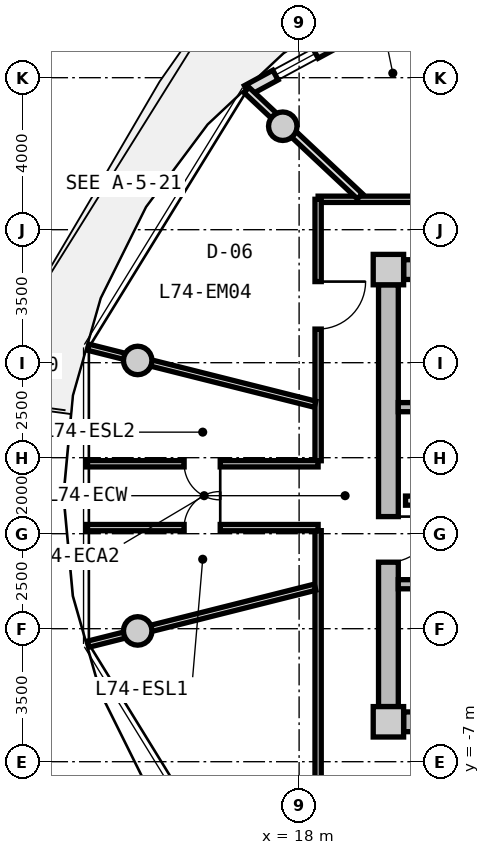
"""IFC4 building model, lengths in metres.
Left out: names, types, materials, properties, quantities, classifications, styles, units other than length and angle.
Written with IfcOpenShell. Run it as: python <this file> out.ifc"""

import sys

from ifc_helpers import new_model, si_unit, direction, frame, frame_2d, origin, origin_2d, place, context, subcontext, project, spatial, rectangle, circle, extrude, source, transform, mapped, element, fill, save


model = new_model("IFC4")
c1 = context("Model", 3, precision=1e-05, world=origin(), true_north=direction((0.0, 1.0)))
c2 = subcontext(c1, "Body", "Model", "MODEL_VIEW")
j1 = project(units=[si_unit("LENGTHUNIT", "METRE"), si_unit("PLANEANGLEUNIT", "RADIAN")], contexts=[c1])
p1 = place(None, origin())
s1 = spatial("IfcSite", under=j1, at=p1, CompositionType="ELEMENT")
p2 = place(p1, origin())
s2 = spatial("IfcBuilding", under=s1, at=p2, CompositionType="ELEMENT")
p3 = place(p2, frame((0.0, 0.0, 238.3)))
s3 = spatial("IfcBuildingStorey", under=s2, at=p3, CompositionType="ELEMENT", Elevation=238.3)
m1 = source(origin(), c2, "Body", "SweptSolid", [
    extrude(rectangle(XDim=0.8, YDim=0.8, at=origin_2d()), origin(), (0.0, 0.0, 1.0), 3.05),
])
for number, where, z_axis, x_axis in (
    (1, (20.35, -5.95, 0.0), (0.0, 0.0, 1.0), (1.0, 0.0, 0.0)),
    (2, (20.35, 5.95, 0.0), (0.0, 0.0, 1.0), (1.0, 0.0, 0.0)),
):
    element("IfcColumn", number, at=place(p3, frame(where, z_axis=z_axis, x_axis=x_axis)), inside=s3, PredefinedType="COLUMN", context=c2, shape_type="MappedRepresentation", body=[
        mapped(m1, transform((0.0, 0.0, 0.0), x_axis=(1.0, 0.0, 0.0), y_axis=(0.0, 1.0, 0.0), z_axis=(0.0, 0.0, 1.0), scale=1.0)),
    ])
m2 = source(origin(), c2, "Body", "SweptSolid", [
    extrude(rectangle(XDim=14.5, YDim=0.52, at=frame_2d((7.25, 0.0))), origin(), (0.0, 0.0, 1.0), 2.81),
])
for number, where, z_axis, x_axis in (
    (3, (20.75, 5.95, 0.0), (0.0, 0.0, 1.0), (1.0, 0.0, 0.0)),
    (4, (35.25, -5.95, 0.0), (0.0, 0.0, 1.0), (-1.0, 0.0, 0.0)),
):
    element("IfcWall", number, at=place(p3, frame(where, z_axis=z_axis, x_axis=x_axis)), inside=s3, PredefinedType="SHEAR", context=c2, shape_type="MappedRepresentation", body=[
        mapped(m2, transform((0.0, 0.0, 0.0), x_axis=(1.0, 0.0, 0.0), y_axis=(0.0, 1.0, 0.0), z_axis=(0.0, 0.0, 1.0), scale=1.0)),
    ])
m3 = source(origin(), c2, "Body", "SweptSolid", [
    extrude(rectangle(XDim=11.1, YDim=0.52, at=frame_2d((5.55, 0.0))), origin(), (0.0, 0.0, 1.0), 2.81),
])
p4 = place(p3, frame((20.35, -5.55, 0.0), z_axis=(0.0, 0.0, 1.0), x_axis=(0.0, 1.0, 0.0)))
e5 = element("IfcWall", 5, at=p4, inside=s3, PredefinedType="SHEAR", context=c2, shape_type="MappedRepresentation", body=[
    mapped(m3, transform((0.0, 0.0, 0.0), x_axis=(1.0, 0.0, 0.0), y_axis=(0.0, 1.0, 0.0), z_axis=(0.0, 0.0, 1.0), scale=1.0)),
])
p5 = place(p4, frame((3.8, 0.0, 0.0)))
e6 = element("IfcOpeningElement", 6, at=p5, cuts=e5, PredefinedType="OPENING", context=c2, shape_type="SweptSolid", body=[
    extrude(rectangle(XDim=1.2, YDim=2.15, at=frame_2d((0.6, 1.075))), frame((0.0, 0.27, 0.0), z_axis=(0.0, -1.0, 0.0), x_axis=(1.0, 0.0, 0.0)), (0.0, 0.0, 1.0), 0.54),
])
m4 = source(origin(), c2, "Body", "SweptSolid", [
    extrude(circle(Radius=0.375, at=origin_2d()), origin(), (0.0, 0.0, 1.0), 3.05),
])
for number, where, z_axis, x_axis in (
    (7, (17.57, 9.723, 0.0), (0.0, 0.0, 1.0), (1.0, 0.0, 0.0)),
    (8, (13.753, 3.559, 0.0), (0.0, 0.0, 1.0), (1.0, 0.0, 0.0)),
    (9, (13.753, -3.559, 0.0), (0.0, 0.0, 1.0), (1.0, 0.0, 0.0)),
):
    element("IfcColumn", number, at=place(p3, frame(where, z_axis=z_axis, x_axis=x_axis)), inside=s3, PredefinedType="COLUMN", context=c2, shape_type="MappedRepresentation", body=[
        mapped(m4, transform((0.0, 0.0, 0.0), x_axis=(1.0, 0.0, 0.0), y_axis=(0.0, 1.0, 0.0), z_axis=(0.0, 0.0, 1.0), scale=1.0)),
    ])
m5 = source(origin(), c2, "Body", "SweptSolid", [
    extrude(rectangle(XDim=8.197, YDim=0.29, at=frame_2d((4.099, 0.0))), origin(), (0.0, 0.0, 1.0), 2.81),
])
p6 = place(p3, frame((16.63, 10.663, 0.0), z_axis=(0.0, 0.0, 1.0), x_axis=(0.879369910001, 0.476139224791, 0.0)))
e10 = element("IfcWall", 10, at=p6, inside=s3, PredefinedType="SOLIDWALL", context=c2, shape_type="MappedRepresentation", body=[
    mapped(m5, transform((0.0, 0.0, 0.0), x_axis=(1.0, 0.0, 0.0), y_axis=(0.0, 1.0, 0.0), z_axis=(0.0, 0.0, 1.0), scale=1.0)),
])
p7 = place(p6, frame((6.18, 0.0, 0.0)))
e11 = element("IfcOpeningElement", 11, at=p7, cuts=e10, PredefinedType="OPENING", context=c2, shape_type="SweptSolid", body=[
    extrude(rectangle(XDim=1.15, YDim=2.25, at=frame_2d((0.575, 1.125))), frame((0.0, 0.155, 0.0), z_axis=(0.0, -1.0, 0.0), x_axis=(1.0, 0.0, 0.0)), (0.0, 0.0, 1.0), 0.31),
])
p8 = place(p6, frame((0.85, 0.0, 0.85)))
e12 = element("IfcOpeningElement", 12, at=p8, cuts=e10, PredefinedType="OPENING", context=c2, shape_type="SweptSolid", body=[
    extrude(rectangle(XDim=1.2, YDim=1.5, at=frame_2d((0.6, 0.75))), frame((0.0, 0.155, 0.0), z_axis=(0.0, -1.0, 0.0), x_axis=(1.0, 0.0, 0.0)), (0.0, 0.0, 1.0), 0.31),
])
m6 = source(origin(), c2, "Body", "SweptSolid", [
    extrude(rectangle(XDim=7.93, YDim=0.24, at=frame_2d((3.965, 0.0))), origin(), (0.0, 0.0, 1.0), 2.81),
])
p9 = place(p3, frame((20.61, 2.33, 0.0), z_axis=(0.0, 0.0, 1.0), x_axis=(1.0, 0.0, 0.0)))
e13 = element("IfcWall", 13, at=p9, inside=s3, PredefinedType="PARTITIONING", context=c2, shape_type="MappedRepresentation", body=[
    mapped(m6, transform((0.0, 0.0, 0.0), x_axis=(1.0, 0.0, 0.0), y_axis=(0.0, 1.0, 0.0), z_axis=(0.0, 0.0, 1.0), scale=1.0)),
])
p10 = place(p3, frame((20.61, -2.33, 0.0), z_axis=(0.0, 0.0, 1.0), x_axis=(1.0, 0.0, 0.0)))
e14 = element("IfcWall", 14, at=p10, inside=s3, PredefinedType="PARTITIONING", context=c2, shape_type="MappedRepresentation", body=[
    mapped(m6, transform((0.0, 0.0, 0.0), x_axis=(1.0, 0.0, 0.0), y_axis=(0.0, 1.0, 0.0), z_axis=(0.0, 0.0, 1.0), scale=1.0)),
])
p11 = place(p10, frame((1.05, 0.0, 0.0)))
e15 = element("IfcOpeningElement", 15, at=p11, cuts=e14, PredefinedType="OPENING", context=c2, shape_type="SweptSolid", body=[
    extrude(rectangle(XDim=1.1, YDim=2.15, at=frame_2d((0.55, 1.075))), frame((0.0, 0.13, 0.0), z_axis=(0.0, -1.0, 0.0), x_axis=(1.0, 0.0, 0.0)), (0.0, 0.0, 1.0), 0.26),
])
m7 = source(origin(), c2, "Body", "SweptSolid", [
    extrude(rectangle(XDim=7.62, YDim=0.24, at=frame_2d((3.81, 0.0))), origin(), (0.0, 0.0, 1.0), 2.795),
])
p12 = place(p3, frame((20.8, -0.13, 0.0), z_axis=(0.0, 0.0, 1.0), x_axis=(1.0, 0.0, 0.0)))
e16 = element("IfcWall", 16, at=p12, inside=s3, PredefinedType="PARTITIONING", context=c2, shape_type="MappedRepresentation", body=[
    mapped(m7, transform((0.0, 0.0, 0.0), x_axis=(1.0, 0.0, 0.0), y_axis=(0.0, 1.0, 0.0), z_axis=(0.0, 0.0, 1.0), scale=1.0)),
])
p13 = place(p12, frame((6.22, 0.0, 0.0)))
e17 = element("IfcOpeningElement", 17, at=p13, cuts=e16, PredefinedType="OPENING", context=c2, shape_type="SweptSolid", body=[
    extrude(rectangle(XDim=1.0, YDim=2.1, at=frame_2d((0.5, 1.05))), frame((0.0, 0.13, 0.0), z_axis=(0.0, -1.0, 0.0), x_axis=(1.0, 0.0, 0.0)), (0.0, 0.0, 1.0), 0.26),
])
p14 = place(p12, frame((2.4, 0.0, 0.0)))
e18 = element("IfcOpeningElement", 18, at=p14, cuts=e16, PredefinedType="OPENING", context=c2, shape_type="SweptSolid", body=[
    extrude(rectangle(XDim=1.0, YDim=2.1, at=frame_2d((0.5, 1.05))), frame((0.0, 0.13, 0.0), z_axis=(0.0, -1.0, 0.0), x_axis=(1.0, 0.0, 0.0)), (0.0, 0.0, 1.0), 0.26),
])
m8 = source(origin(), c2, "Body", "SweptSolid", [
    extrude(rectangle(XDim=8.58, YDim=0.165, at=frame_2d((4.29, 0.0))), origin(), (0.0, 0.0, 1.0), 2.795),
])
p15 = place(p3, frame((18.5, 7.8, 0.0), z_axis=(0.0, 0.0, 1.0), x_axis=(1.0, 0.0, 0.0)))
e19 = element("IfcWall", 19, at=p15, inside=s3, PredefinedType="PARTITIONING", context=c2, shape_type="MappedRepresentation", body=[
    mapped(m8, transform((0.0, 0.0, 0.0), x_axis=(1.0, 0.0, 0.0), y_axis=(0.0, 1.0, 0.0), z_axis=(0.0, 0.0, 1.0), scale=1.0)),
])
p16 = place(p15, frame((2.515, 0.0, 0.0)))
e20 = element("IfcOpeningElement", 20, at=p16, cuts=e19, PredefinedType="OPENING", context=c2, shape_type="SweptSolid", body=[
    extrude(rectangle(XDim=1.05, YDim=2.15, at=frame_2d((0.525, 1.075))), frame((0.0, 0.093, 0.0), z_axis=(0.0, -1.0, 0.0), x_axis=(1.0, 0.0, 0.0)), (0.0, 0.0, 1.0), 0.185),
])
m9 = source(origin(), c2, "Body", "SweptSolid", [
    extrude(rectangle(XDim=6.88, YDim=0.165, at=frame_2d((3.44, 0.0))), origin(), (0.0, 0.0, 1.0), 2.795),
])
p17 = place(p3, frame((18.5, -7.8, 0.0), z_axis=(0.0, 0.0, 1.0), x_axis=(0.0, 1.0, 0.0)))
e21 = element("IfcWall", 21, at=p17, inside=s3, PredefinedType="PARTITIONING", context=c2, shape_type="MappedRepresentation", body=[
    mapped(m9, transform((0.0, 0.0, 0.0), x_axis=(1.0, 0.0, 0.0), y_axis=(0.0, 1.0, 0.0), z_axis=(0.0, 0.0, 1.0), scale=1.0)),
])
p18 = place(p3, frame((18.5, 0.92, 0.0), z_axis=(0.0, 0.0, 1.0), x_axis=(0.0, 1.0, 0.0)))
e22 = element("IfcWall", 22, at=p18, inside=s3, PredefinedType="PARTITIONING", context=c2, shape_type="MappedRepresentation", body=[
    mapped(m9, transform((0.0, 0.0, 0.0), x_axis=(1.0, 0.0, 0.0), y_axis=(0.0, 1.0, 0.0), z_axis=(0.0, 0.0, 1.0), scale=1.0)),
])
p19 = place(p18, frame((3.464, 0.0, 0.0)))
e23 = element("IfcOpeningElement", 23, at=p19, cuts=e22, PredefinedType="OPENING", context=c2, shape_type="SweptSolid", body=[
    extrude(rectangle(XDim=1.25, YDim=2.2, at=frame_2d((0.625, 1.1))), frame((0.0, 0.093, 0.0), z_axis=(0.0, -1.0, 0.0), x_axis=(1.0, 0.0, 0.0)), (0.0, 0.0, 1.0), 0.185),
])
m10 = source(origin(), c2, "Body", "SweptSolid", [
    extrude(rectangle(XDim=6.157, YDim=0.165, at=frame_2d((3.079, 0.0))), origin(), (0.0, 0.0, 1.0), 2.395),
])
for number, where, z_axis, x_axis in (
    (24, (18.42, 2.407, 0.0), (0.0, 0.0, 1.0), (-0.97, 0.244, 0.0)),
    (25, (18.42, -2.407, 0.0), (0.0, 0.0, 1.0), (-0.97, -0.244, 0.0)),
):
    element("IfcWall", number, at=place(p3, frame(where, z_axis=z_axis, x_axis=x_axis)), inside=s3, PredefinedType="PARTITIONING", context=c2, shape_type="MappedRepresentation", body=[
        mapped(m10, transform((0.0, 0.0, 0.0), x_axis=(1.0, 0.0, 0.0), y_axis=(0.0, 1.0, 0.0), z_axis=(0.0, 0.0, 1.0), scale=1.0)),
    ])
m11 = source(origin(), c2, "Body", "SweptSolid", [
    extrude(rectangle(XDim=6.101, YDim=0.165, at=frame_2d((3.051, 0.0))), origin(), (0.0, 0.0, 1.0), 2.795),
])
p20 = place(p3, frame((12.399, 0.84, 0.0), z_axis=(0.0, 0.0, 1.0), x_axis=(1.0, 0.0, 0.0)))
e26 = element("IfcWall", 26, at=p20, inside=s3, PredefinedType="PARTITIONING", context=c2, shape_type="MappedRepresentation", body=[
    mapped(m11, transform((0.0, 0.0, 0.0), x_axis=(1.0, 0.0, 0.0), y_axis=(0.0, 1.0, 0.0), z_axis=(0.0, 0.0, 1.0), scale=1.0)),
])
p21 = place(p20, frame((2.576, 0.0, 0.0)))
e27 = element("IfcOpeningElement", 27, at=p21, cuts=e26, PredefinedType="OPENING", context=c2, shape_type="SweptSolid", body=[
    extrude(rectangle(XDim=0.95, YDim=2.1, at=frame_2d((0.475, 1.05))), frame((0.0, 0.093, 0.0), z_axis=(0.0, -1.0, 0.0), x_axis=(1.0, 0.0, 0.0)), (0.0, 0.0, 1.0), 0.185),
])
p22 = place(p3, frame((18.5, -0.84, 0.0), z_axis=(0.0, 0.0, 1.0), x_axis=(-1.0, 0.0, 0.0)))
e28 = element("IfcWall", 28, at=p22, inside=s3, PredefinedType="PARTITIONING", context=c2, shape_type="MappedRepresentation", body=[
    mapped(m11, transform((0.0, 0.0, 0.0), x_axis=(1.0, 0.0, 0.0), y_axis=(0.0, 1.0, 0.0), z_axis=(0.0, 0.0, 1.0), scale=1.0)),
])
p23 = place(p22, frame((2.576, 0.0, 0.0)))
e29 = element("IfcOpeningElement", 29, at=p23, cuts=e28, PredefinedType="OPENING", context=c2, shape_type="SweptSolid", body=[
    extrude(rectangle(XDim=0.95, YDim=2.1, at=frame_2d((0.475, 1.05))), frame((0.0, 0.093, 0.0), z_axis=(0.0, -1.0, 0.0), x_axis=(1.0, 0.0, 0.0)), (0.0, 0.0, 1.0), 0.185),
])
m12 = source(origin(), c2, "Body", "SweptSolid", [
    extrude(rectangle(XDim=4.089, YDim=0.19, at=frame_2d((2.044, 0.0))), origin(), (0.0, 0.0, 1.0), 2.395),
])
p24 = place(p3, frame((19.598, 7.88, 0.0), z_axis=(0.0, 0.0, 1.0), x_axis=(-0.729401273609, 0.684086092577, 0.0)))
e30 = element("IfcWall", 30, at=p24, inside=s3, PredefinedType="PARTITIONING", context=c2, shape_type="MappedRepresentation", body=[
    mapped(m12, transform((0.0, 0.0, 0.0), x_axis=(1.0, 0.0, 0.0), y_axis=(0.0, 1.0, 0.0), z_axis=(0.0, 0.0, 1.0), scale=1.0)),
])
m13 = source(origin(), c2, "Body", "SweptSolid", [
    extrude(rectangle(XDim=1.2, YDim=1.5, at=frame_2d((0.6, 0.75))), frame((0.0, 0.03, 0.0), z_axis=(0.0, -1.0, 0.0), x_axis=(1.0, 0.0, 0.0)), (0.0, 0.0, 1.0), 0.06),
])
p25 = place(p8, origin())
e31 = element("IfcWindow", 31, at=p25, inside=s3, PartitioningType="SINGLE_PANEL", PredefinedType="WINDOW", context=c2, shape_type="MappedRepresentation", body=[
    mapped(m13, transform((0.0, 0.0, 0.0), x_axis=(1.0, 0.0, 0.0), y_axis=(0.0, 1.0, 0.0), z_axis=(0.0, 0.0, 1.0), scale=1.0)),
])
fill(e12, e31)
m14 = source(origin(), c2, "Body", "SweptSolid", [
    extrude(rectangle(XDim=1.2, YDim=2.15, at=frame_2d((0.6, 1.075))), frame((0.0, 0.025, 0.0), z_axis=(0.0, -1.0, 0.0), x_axis=(1.0, 0.0, 0.0)), (0.0, 0.0, 1.0), 0.05),
])
p26 = place(p5, frame((1.2, 0.0, 0.0), z_axis=(0.0, 0.0, 1.0), x_axis=(-1.0, 0.0, 0.0)))
e32 = element("IfcDoor", 32, at=p26, inside=s3, OperationType="SINGLE_SWING_LEFT", PredefinedType="DOOR", context=c2, shape_type="MappedRepresentation", body=[
    mapped(m14, transform((0.0, 0.0, 0.0), x_axis=(1.0, 0.0, 0.0), y_axis=(0.0, 1.0, 0.0), z_axis=(0.0, 0.0, 1.0), scale=1.0)),
])
fill(e6, e32)
m15 = source(origin(), c2, "Body", "SweptSolid", [
    extrude(rectangle(XDim=0.95, YDim=2.1, at=frame_2d((0.475, 1.05))), frame((0.0, 0.025, 0.0), z_axis=(0.0, -1.0, 0.0), x_axis=(1.0, 0.0, 0.0)), (0.0, 0.0, 1.0), 0.05),
])
p27 = place(p23, frame((0.95, 0.0, 0.0), z_axis=(0.0, 0.0, 1.0), x_axis=(-1.0, 0.0, 0.0)))
e33 = element("IfcDoor", 33, at=p27, inside=s3, OperationType="SINGLE_SWING_RIGHT", PredefinedType="DOOR", context=c2, shape_type="MappedRepresentation", body=[
    mapped(m15, transform((0.0, 0.0, 0.0), x_axis=(1.0, 0.0, 0.0), y_axis=(0.0, 1.0, 0.0), z_axis=(0.0, 0.0, 1.0), scale=1.0)),
])
fill(e29, e33)
p28 = place(p21, frame((0.95, 0.0, 0.0), z_axis=(0.0, 0.0, 1.0), x_axis=(-1.0, 0.0, 0.0)))
e34 = element("IfcDoor", 34, at=p28, inside=s3, OperationType="SINGLE_SWING_LEFT", PredefinedType="DOOR", context=c2, shape_type="MappedRepresentation", body=[
    mapped(m15, transform((0.0, 0.0, 0.0), x_axis=(1.0, 0.0, 0.0), y_axis=(0.0, 1.0, 0.0), z_axis=(0.0, 0.0, 1.0), scale=1.0)),
])
fill(e27, e34)
m16 = source(origin(), c2, "Body", "SweptSolid", [
    extrude(rectangle(XDim=1.25, YDim=2.2, at=frame_2d((0.625, 1.1))), frame((0.0, 0.025, 0.0), z_axis=(0.0, -1.0, 0.0), x_axis=(1.0, 0.0, 0.0)), (0.0, 0.0, 1.0), 0.05),
])
p29 = place(p19, frame((1.25, 0.0, 0.0), z_axis=(0.0, 0.0, 1.0), x_axis=(-1.0, 0.0, 0.0)))
e35 = element("IfcDoor", 35, at=p29, inside=s3, OperationType="SINGLE_SWING_LEFT", PredefinedType="DOOR", context=c2, shape_type="MappedRepresentation", body=[
    mapped(m16, transform((0.0, 0.0, 0.0), x_axis=(1.0, 0.0, 0.0), y_axis=(0.0, 1.0, 0.0), z_axis=(0.0, 0.0, 1.0), scale=1.0)),
])
fill(e23, e35)
save(model, sys.argv[1])
